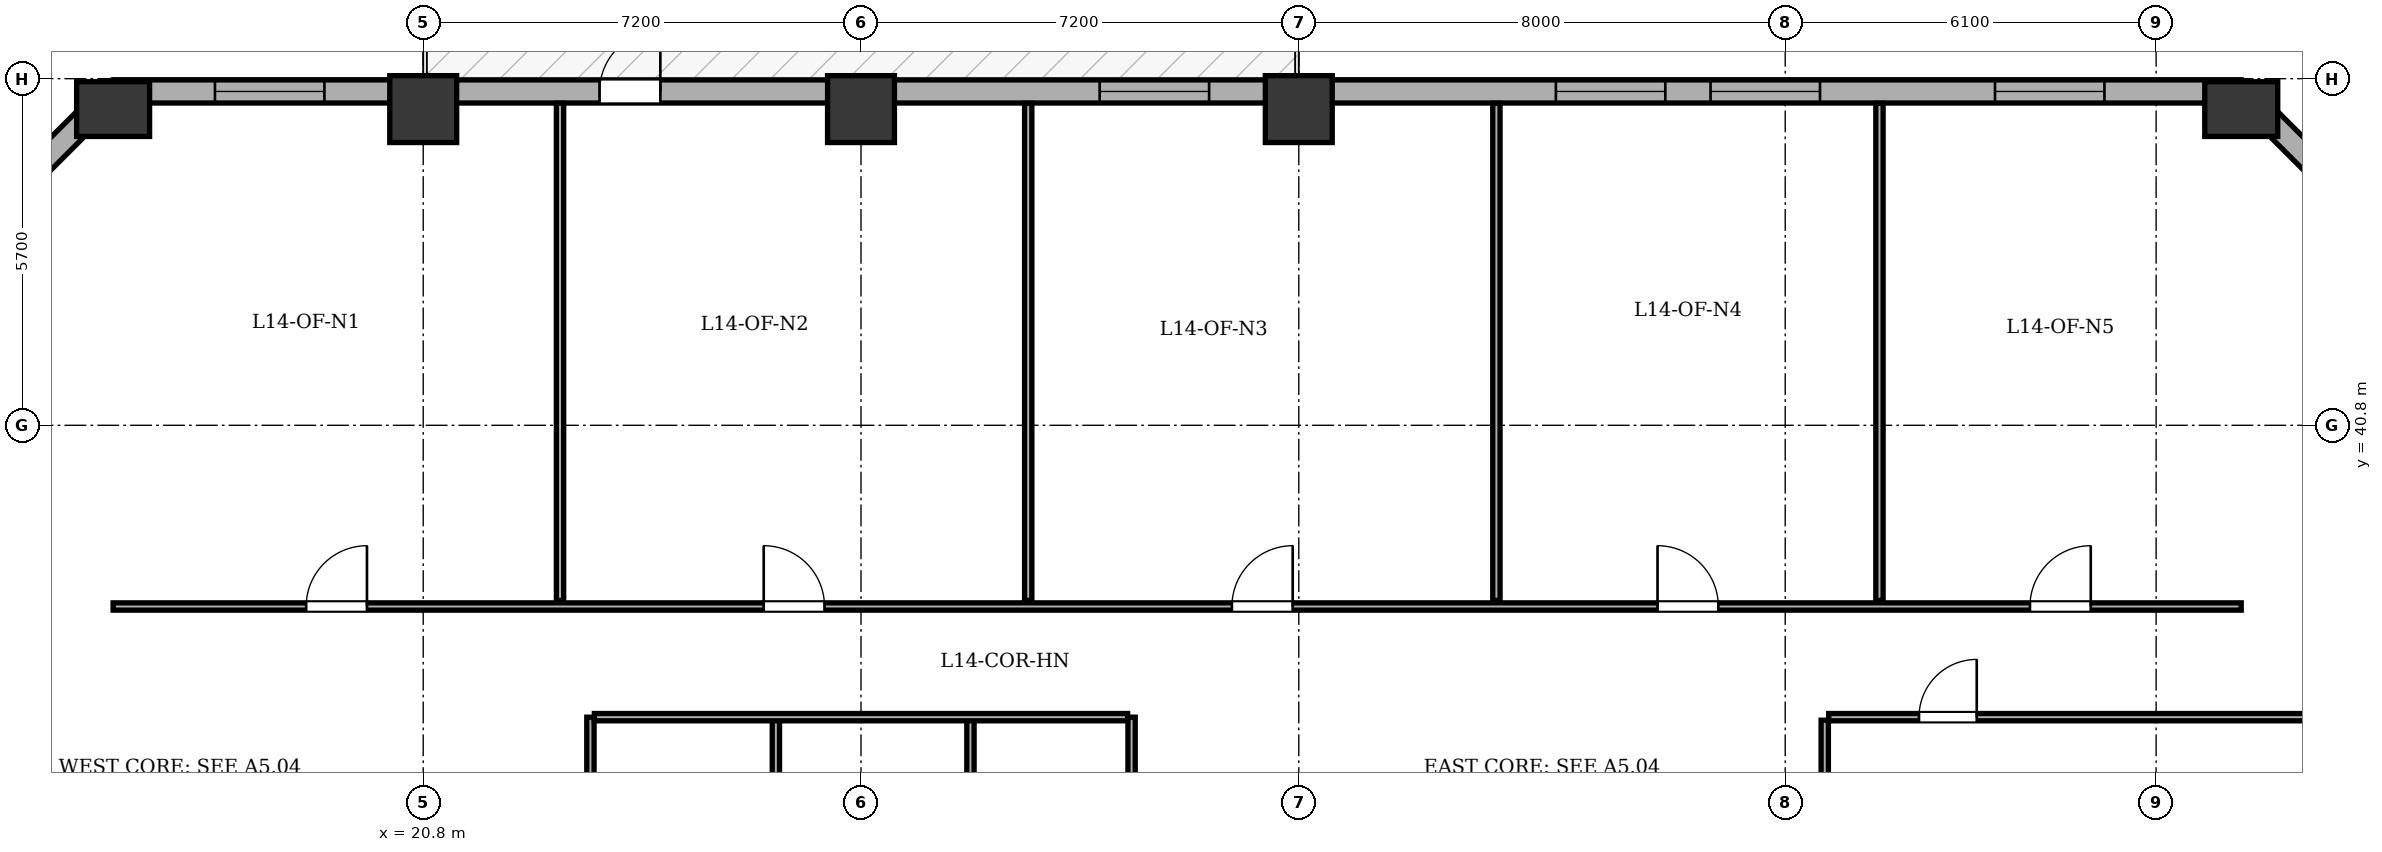
"""IFC4 building model, lengths in metres.
Left out: names, types, materials, properties, quantities, classifications, styles, units other than length and angle.
Written with IfcOpenShell. Run it as: python <this file> out.ifc"""

import sys

from ifc_helpers import new_model, si_unit, direction, frame, frame_2d, origin, origin_2d, place, context, subcontext, project, spatial, rectangle, extrude, element, fill, save


model = new_model("IFC4")
c1 = context("Model", 3, precision=1e-05, world=origin(), true_north=direction((0.0, 1.0)))
c2 = subcontext(c1, "Body", "Model", "MODEL_VIEW")
j1 = project(units=[si_unit("LENGTHUNIT", "METRE"), si_unit("PLANEANGLEUNIT", "RADIAN")], contexts=[c1])
p1 = place(None, origin())
s1 = spatial("IfcSite", under=j1, at=p1, CompositionType="ELEMENT")
p2 = place(p1, origin())
s2 = spatial("IfcBuilding", under=s1, at=p2, CompositionType="ELEMENT")
p3 = place(p2, frame((0.0, 0.0, 59.4)))
s3 = spatial("IfcBuildingStorey", under=s2, at=p3, CompositionType="ELEMENT", Elevation=59.4)
p4 = place(p3, frame((15.7, 46.0, 0.0), z_axis=(0.0, 0.0, 1.0), x_axis=(1.0, 0.0, 0.0)))
e1 = element("IfcColumn", 1, at=p4, inside=s3, PredefinedType="COLUMN", context=c2, shape_type="SweptSolid", body=[
    extrude(rectangle(XDim=0.9, YDim=1.2, at=origin_2d()), origin(), (0.0, 0.0, 1.0), 3.9),
])
for number, where, z_axis, x_axis in (
    (2, (20.8, 46.0, 0.0), (0.0, 0.0, 1.0), (1.0, 0.0, 0.0)),
    (3, (28.0, 46.0, 0.0), (0.0, 0.0, 1.0), (1.0, 0.0, 0.0)),
    (4, (35.2, 46.0, 0.0), (0.0, 0.0, 1.0), (1.0, 0.0, 0.0)),
):
    element("IfcColumn", number, at=place(p3, frame(where, z_axis=z_axis, x_axis=x_axis)), inside=s3, PredefinedType="COLUMN", context=c2, shape_type="SweptSolid", body=[
        extrude(rectangle(XDim=1.1, YDim=1.1, at=origin_2d()), origin(), (0.0, 0.0, 1.0), 3.9),
    ])
p5 = place(p3, frame((50.7, 46.0, 0.0), z_axis=(0.0, 0.0, 1.0), x_axis=(1.0, 0.0, 0.0)))
e5 = element("IfcColumn", 5, at=p5, inside=s3, PredefinedType="COLUMN", context=c2, shape_type="SweptSolid", body=[
    extrude(rectangle(XDim=0.9, YDim=1.2, at=origin_2d()), origin(), (0.0, 0.0, 1.0), 3.9),
])
p6 = place(p3, frame((10.91, 41.5, 0.0), z_axis=(0.0, 0.0, 1.0), x_axis=(0.707106781187, 0.707106781187, 0.0)))
e6 = element("IfcWall", 6, at=p6, inside=s3, PredefinedType="STANDARD", context=c2, shape_type="SweptSolid", body=[
    extrude(rectangle(XDim=6.774, YDim=0.38, at=frame_2d((3.387, 0.0))), origin(), (0.0, 0.0, 1.0), 3.135),
])
p7 = place(p6, frame((2.687, 0.0, 0.8)))
e7 = element("IfcOpeningElement", 7, at=p7, cuts=e6, PredefinedType="OPENING", context=c2, shape_type="SweptSolid", body=[
    extrude(rectangle(XDim=1.4, YDim=1.65, at=frame_2d((0.7, 0.825))), frame((0.0, 0.2, 0.0), z_axis=(0.0, -1.0, 0.0), x_axis=(1.0, 0.0, 0.0)), (0.0, 0.0, 1.0), 0.4),
])
p8 = place(p3, frame((15.7, 46.29, 0.0), z_axis=(0.0, 0.0, 1.0), x_axis=(1.0, 0.0, 0.0)))
e8 = element("IfcWall", 8, at=p8, inside=s3, PredefinedType="STANDARD", context=c2, shape_type="SweptSolid", body=[
    extrude(rectangle(XDim=35.0, YDim=0.38, at=frame_2d((17.5, 0.0))), origin(), (0.0, 0.0, 1.0), 3.135),
])
p9 = place(p8, frame((8.0, 0.0, 0.0)))
e9 = element("IfcOpeningElement", 9, at=p9, cuts=e8, PredefinedType="OPENING", context=c2, shape_type="SweptSolid", body=[
    extrude(rectangle(XDim=1.0, YDim=2.02, at=frame_2d((0.5, 1.01))), frame((0.0, 0.2, 0.0), z_axis=(0.0, -1.0, 0.0), x_axis=(1.0, 0.0, 0.0)), (0.0, 0.0, 1.0), 0.4),
])
p10 = place(p8, frame((1.675, 0.0, 0.8)))
e10 = element("IfcOpeningElement", 10, at=p10, cuts=e8, PredefinedType="OPENING", context=c2, shape_type="SweptSolid", body=[
    extrude(rectangle(XDim=1.8, YDim=1.9, at=frame_2d((0.9, 0.95))), frame((0.0, 0.2, 0.0), z_axis=(0.0, -1.0, 0.0), x_axis=(1.0, 0.0, 0.0)), (0.0, 0.0, 1.0), 0.4),
])
p11 = place(p8, frame((16.225, 0.0, 0.8)))
e11 = element("IfcOpeningElement", 11, at=p11, cuts=e8, PredefinedType="OPENING", context=c2, shape_type="SweptSolid", body=[
    extrude(rectangle(XDim=1.8, YDim=1.9, at=frame_2d((0.9, 0.95))), frame((0.0, 0.2, 0.0), z_axis=(0.0, -1.0, 0.0), x_axis=(1.0, 0.0, 0.0)), (0.0, 0.0, 1.0), 0.4),
])
p12 = place(p8, frame((23.728, 0.0, 0.8)))
e12 = element("IfcOpeningElement", 12, at=p12, cuts=e8, PredefinedType="OPENING", context=c2, shape_type="SweptSolid", body=[
    extrude(rectangle(XDim=1.8, YDim=1.9, at=frame_2d((0.9, 0.95))), frame((0.0, 0.2, 0.0), z_axis=(0.0, -1.0, 0.0), x_axis=(1.0, 0.0, 0.0)), (0.0, 0.0, 1.0), 0.4),
])
p13 = place(p8, frame((26.272, 0.0, 0.8)))
e13 = element("IfcOpeningElement", 13, at=p13, cuts=e8, PredefinedType="OPENING", context=c2, shape_type="SweptSolid", body=[
    extrude(rectangle(XDim=1.8, YDim=1.9, at=frame_2d((0.9, 0.95))), frame((0.0, 0.2, 0.0), z_axis=(0.0, -1.0, 0.0), x_axis=(1.0, 0.0, 0.0)), (0.0, 0.0, 1.0), 0.4),
])
p14 = place(p8, frame((30.95, 0.0, 0.8)))
e14 = element("IfcOpeningElement", 14, at=p14, cuts=e8, PredefinedType="OPENING", context=c2, shape_type="SweptSolid", body=[
    extrude(rectangle(XDim=1.8, YDim=1.9, at=frame_2d((0.9, 0.95))), frame((0.0, 0.2, 0.0), z_axis=(0.0, -1.0, 0.0), x_axis=(1.0, 0.0, 0.0)), (0.0, 0.0, 1.0), 0.4),
])
p15 = place(p3, frame((50.7, 46.29, 0.0), z_axis=(0.0, 0.0, 1.0), x_axis=(0.707106781187, -0.707106781187, 0.0)))
e15 = element("IfcWall", 15, at=p15, inside=s3, PredefinedType="STANDARD", context=c2, shape_type="SweptSolid", body=[
    extrude(rectangle(XDim=6.774, YDim=0.38, at=frame_2d((3.387, 0.0))), origin(), (0.0, 0.0, 1.0), 3.135),
])
p16 = place(p15, frame((2.687, 0.0, 0.8)))
e16 = element("IfcOpeningElement", 16, at=p16, cuts=e15, PredefinedType="OPENING", context=c2, shape_type="SweptSolid", body=[
    extrude(rectangle(XDim=1.4, YDim=1.65, at=frame_2d((0.7, 0.825))), frame((0.0, 0.2, 0.0), z_axis=(0.0, -1.0, 0.0), x_axis=(1.0, 0.0, 0.0)), (0.0, 0.0, 1.0), 0.4),
])
for number, where, z_axis, x_axis in (
    (17, (23.55, 24.715, 0.0), (0.0, 0.0, 1.0), (0.0, 1.0, 0.0)),
    (18, (32.45, 24.715, 0.0), (0.0, 0.0, 1.0), (0.0, 1.0, 0.0)),
    (19, (26.6, 24.715, 0.0), (0.0, 0.0, 1.0), (0.0, 1.0, 0.0)),
):
    element("IfcWall", number, at=place(p3, frame(where, z_axis=z_axis, x_axis=x_axis)), inside=s3, PredefinedType="PARTITIONING", context=c2, shape_type="SweptSolid", body=[
        extrude(rectangle(XDim=11.285, YDim=0.12, at=frame_2d((5.643, 0.0))), origin(), (0.0, 0.0, 1.0), 3.6),
    ])
p17 = place(p3, frame((29.8, 24.715, 0.0), z_axis=(0.0, 0.0, 1.0), x_axis=(0.0, 1.0, 0.0)))
e20 = element("IfcWall", 20, at=p17, inside=s3, PredefinedType="PARTITIONING", context=c2, shape_type="SweptSolid", body=[
    extrude(rectangle(XDim=11.285, YDim=0.12, at=frame_2d((5.643, 0.0))), origin(), (0.0, 0.0, 1.0), 3.135),
])
p18 = place(p3, frame((23.615, 36.0, 0.0), z_axis=(0.0, 0.0, 1.0), x_axis=(1.0, 0.0, 0.0)))
e21 = element("IfcWall", 21, at=p18, inside=s3, PredefinedType="PARTITIONING", context=c2, shape_type="SweptSolid", body=[
    extrude(rectangle(XDim=8.77, YDim=0.12, at=frame_2d((4.385, 0.0))), origin(), (0.0, 0.0, 1.0), 3.6),
])
p19 = place(p3, frame((15.7, 37.82, 0.0), z_axis=(0.0, 0.0, 1.0), x_axis=(1.0, 0.0, 0.0)))
e22 = element("IfcWall", 22, at=p19, inside=s3, PredefinedType="PARTITIONING", context=c2, shape_type="SweptSolid", body=[
    extrude(rectangle(XDim=35.0, YDim=0.12, at=frame_2d((17.5, 0.0))), origin(), (0.0, 0.0, 1.0), 3.6),
])
p20 = place(p19, frame((3.175, 0.0, 0.0)))
e23 = element("IfcOpeningElement", 23, at=p20, cuts=e22, PredefinedType="OPENING", context=c2, shape_type="SweptSolid", body=[
    extrude(rectangle(XDim=1.0, YDim=2.1, at=frame_2d((0.5, 1.05))), frame((0.0, 0.07, 0.0), z_axis=(0.0, -1.0, 0.0), x_axis=(1.0, 0.0, 0.0)), (0.0, 0.0, 1.0), 0.14),
])
p21 = place(p19, frame((10.7, 0.0, 0.0)))
e24 = element("IfcOpeningElement", 24, at=p21, cuts=e22, PredefinedType="OPENING", context=c2, shape_type="SweptSolid", body=[
    extrude(rectangle(XDim=1.0, YDim=2.1, at=frame_2d((0.5, 1.05))), frame((0.0, 0.07, 0.0), z_axis=(0.0, -1.0, 0.0), x_axis=(1.0, 0.0, 0.0)), (0.0, 0.0, 1.0), 0.14),
])
p22 = place(p19, frame((18.4, 0.0, 0.0)))
e25 = element("IfcOpeningElement", 25, at=p22, cuts=e22, PredefinedType="OPENING", context=c2, shape_type="SweptSolid", body=[
    extrude(rectangle(XDim=1.0, YDim=2.1, at=frame_2d((0.5, 1.05))), frame((0.0, 0.07, 0.0), z_axis=(0.0, -1.0, 0.0), x_axis=(1.0, 0.0, 0.0)), (0.0, 0.0, 1.0), 0.14),
])
p23 = place(p19, frame((25.4, 0.0, 0.0)))
e26 = element("IfcOpeningElement", 26, at=p23, cuts=e22, PredefinedType="OPENING", context=c2, shape_type="SweptSolid", body=[
    extrude(rectangle(XDim=1.0, YDim=2.1, at=frame_2d((0.5, 1.05))), frame((0.0, 0.07, 0.0), z_axis=(0.0, -1.0, 0.0), x_axis=(1.0, 0.0, 0.0)), (0.0, 0.0, 1.0), 0.14),
])
p24 = place(p19, frame((31.525, 0.0, 0.0)))
e27 = element("IfcOpeningElement", 27, at=p24, cuts=e22, PredefinedType="OPENING", context=c2, shape_type="SweptSolid", body=[
    extrude(rectangle(XDim=1.0, YDim=2.1, at=frame_2d((0.5, 1.05))), frame((0.0, 0.07, 0.0), z_axis=(0.0, -1.0, 0.0), x_axis=(1.0, 0.0, 0.0)), (0.0, 0.0, 1.0), 0.14),
])
for number, where, z_axis, x_axis in (
    (28, (23.05, 37.92, 0.0), (0.0, 0.0, 1.0), (0.0, 1.0, 0.0)),
    (29, (30.75, 37.92, 0.0), (0.0, 0.0, 1.0), (0.0, 1.0, 0.0)),
    (30, (38.45, 37.92, 0.0), (0.0, 0.0, 1.0), (0.0, 1.0, 0.0)),
    (31, (44.75, 37.92, 0.0), (0.0, 0.0, 1.0), (0.0, 1.0, 0.0)),
):
    element("IfcWall", number, at=place(p3, frame(where, z_axis=z_axis, x_axis=x_axis)), inside=s3, PredefinedType="PARTITIONING", context=c2, shape_type="SweptSolid", body=[
        extrude(rectangle(XDim=8.175, YDim=0.12, at=frame_2d((4.087, 0.0))), origin(), (0.0, 0.0, 1.0), 3.6),
    ])
p25 = place(p3, frame((43.85, 18.45, 0.0), z_axis=(0.0, 0.0, 1.0), x_axis=(0.0, 1.0, 0.0)))
e32 = element("IfcWall", 32, at=p25, inside=s3, PredefinedType="PARTITIONING", context=c2, shape_type="SweptSolid", body=[
    extrude(rectangle(XDim=17.5, YDim=0.12, at=frame_2d((8.75, 0.0))), origin(), (0.0, 0.0, 1.0), 3.6),
])
p26 = place(p3, frame((43.915, 36.0, 0.0), z_axis=(0.0, 0.0, 1.0), x_axis=(1.0, 0.0, 0.0)))
e33 = element("IfcWall", 33, at=p26, inside=s3, PredefinedType="PARTITIONING", context=c2, shape_type="SweptSolid", body=[
    extrude(rectangle(XDim=11.38, YDim=0.12, at=frame_2d((5.69, 0.0))), origin(), (0.0, 0.0, 1.0), 3.6),
])
p27 = place(p26, frame((1.485, 0.0, 0.0)))
e34 = element("IfcOpeningElement", 34, at=p27, cuts=e33, PredefinedType="OPENING", context=c2, shape_type="SweptSolid", body=[
    extrude(rectangle(XDim=0.95, YDim=2.1, at=frame_2d((0.475, 1.05))), frame((0.0, 0.07, 0.0), z_axis=(0.0, -1.0, 0.0), x_axis=(1.0, 0.0, 0.0)), (0.0, 0.0, 1.0), 0.14),
])
p28 = place(p9, origin())
e35 = element("IfcDoor", 35, at=p28, inside=s3, OperationType="SINGLE_SWING_RIGHT", PredefinedType="DOOR", context=c2, shape_type="SweptSolid", body=[
    extrude(rectangle(XDim=1.0, YDim=2.02, at=frame_2d((0.5, 1.01))), frame((0.0, 0.025, 0.0), z_axis=(0.0, -1.0, 0.0), x_axis=(1.0, 0.0, 0.0)), (0.0, 0.0, 1.0), 0.05),
])
fill(e9, e35)
p29 = place(p10, origin())
e36 = element("IfcWindow", 36, at=p29, inside=s3, PartitioningType="SINGLE_PANEL", PredefinedType="WINDOW", context=c2, shape_type="SweptSolid", body=[
    extrude(rectangle(XDim=1.8, YDim=1.9, at=frame_2d((0.9, 0.95))), frame((0.0, -0.01, 0.0), z_axis=(0.0, -1.0, 0.0), x_axis=(1.0, 0.0, 0.0)), (0.0, 0.0, 1.0), 0.06),
])
fill(e10, e36)
p30 = place(p11, origin())
e37 = element("IfcWindow", 37, at=p30, inside=s3, PartitioningType="SINGLE_PANEL", PredefinedType="WINDOW", context=c2, shape_type="SweptSolid", body=[
    extrude(rectangle(XDim=1.8, YDim=1.9, at=frame_2d((0.9, 0.95))), frame((0.0, -0.01, 0.0), z_axis=(0.0, -1.0, 0.0), x_axis=(1.0, 0.0, 0.0)), (0.0, 0.0, 1.0), 0.06),
])
fill(e11, e37)
p31 = place(p12, origin())
e38 = element("IfcWindow", 38, at=p31, inside=s3, PartitioningType="SINGLE_PANEL", PredefinedType="WINDOW", context=c2, shape_type="SweptSolid", body=[
    extrude(rectangle(XDim=1.8, YDim=1.9, at=frame_2d((0.9, 0.95))), frame((0.0, -0.01, 0.0), z_axis=(0.0, -1.0, 0.0), x_axis=(1.0, 0.0, 0.0)), (0.0, 0.0, 1.0), 0.06),
])
fill(e12, e38)
p32 = place(p13, origin())
e39 = element("IfcWindow", 39, at=p32, inside=s3, PartitioningType="SINGLE_PANEL", PredefinedType="WINDOW", context=c2, shape_type="SweptSolid", body=[
    extrude(rectangle(XDim=1.8, YDim=1.9, at=frame_2d((0.9, 0.95))), frame((0.0, -0.01, 0.0), z_axis=(0.0, -1.0, 0.0), x_axis=(1.0, 0.0, 0.0)), (0.0, 0.0, 1.0), 0.06),
])
fill(e13, e39)
p33 = place(p14, origin())
e40 = element("IfcWindow", 40, at=p33, inside=s3, PartitioningType="SINGLE_PANEL", PredefinedType="WINDOW", context=c2, shape_type="SweptSolid", body=[
    extrude(rectangle(XDim=1.8, YDim=1.9, at=frame_2d((0.9, 0.95))), frame((0.0, -0.01, 0.0), z_axis=(0.0, -1.0, 0.0), x_axis=(1.0, 0.0, 0.0)), (0.0, 0.0, 1.0), 0.06),
])
fill(e14, e40)
p34 = place(p20, origin())
e41 = element("IfcDoor", 41, at=p34, inside=s3, OperationType="SINGLE_SWING_RIGHT", PredefinedType="DOOR", context=c2, shape_type="SweptSolid", body=[
    extrude(rectangle(XDim=1.0, YDim=2.1, at=frame_2d((0.5, 1.05))), frame((0.0, 0.025, 0.0), z_axis=(0.0, -1.0, 0.0), x_axis=(1.0, 0.0, 0.0)), (0.0, 0.0, 1.0), 0.05),
])
fill(e23, e41)
p35 = place(p21, origin())
e42 = element("IfcDoor", 42, at=p35, inside=s3, OperationType="SINGLE_SWING_LEFT", PredefinedType="DOOR", context=c2, shape_type="SweptSolid", body=[
    extrude(rectangle(XDim=1.0, YDim=2.1, at=frame_2d((0.5, 1.05))), frame((0.0, 0.025, 0.0), z_axis=(0.0, -1.0, 0.0), x_axis=(1.0, 0.0, 0.0)), (0.0, 0.0, 1.0), 0.05),
])
fill(e24, e42)
p36 = place(p22, origin())
e43 = element("IfcDoor", 43, at=p36, inside=s3, OperationType="SINGLE_SWING_RIGHT", PredefinedType="DOOR", context=c2, shape_type="SweptSolid", body=[
    extrude(rectangle(XDim=1.0, YDim=2.1, at=frame_2d((0.5, 1.05))), frame((0.0, 0.025, 0.0), z_axis=(0.0, -1.0, 0.0), x_axis=(1.0, 0.0, 0.0)), (0.0, 0.0, 1.0), 0.05),
])
fill(e25, e43)
p37 = place(p23, origin())
e44 = element("IfcDoor", 44, at=p37, inside=s3, OperationType="SINGLE_SWING_LEFT", PredefinedType="DOOR", context=c2, shape_type="SweptSolid", body=[
    extrude(rectangle(XDim=1.0, YDim=2.1, at=frame_2d((0.5, 1.05))), frame((0.0, 0.025, 0.0), z_axis=(0.0, -1.0, 0.0), x_axis=(1.0, 0.0, 0.0)), (0.0, 0.0, 1.0), 0.05),
])
fill(e26, e44)
p38 = place(p24, origin())
e45 = element("IfcDoor", 45, at=p38, inside=s3, OperationType="SINGLE_SWING_RIGHT", PredefinedType="DOOR", context=c2, shape_type="SweptSolid", body=[
    extrude(rectangle(XDim=1.0, YDim=2.1, at=frame_2d((0.5, 1.05))), frame((0.0, 0.025, 0.0), z_axis=(0.0, -1.0, 0.0), x_axis=(1.0, 0.0, 0.0)), (0.0, 0.0, 1.0), 0.05),
])
fill(e27, e45)
p39 = place(p27, origin())
e46 = element("IfcDoor", 46, at=p39, inside=s3, OperationType="SINGLE_SWING_RIGHT", PredefinedType="DOOR", context=c2, shape_type="SweptSolid", body=[
    extrude(rectangle(XDim=0.95, YDim=2.1, at=frame_2d((0.475, 1.05))), frame((0.0, 0.025, 0.0), z_axis=(0.0, -1.0, 0.0), x_axis=(1.0, 0.0, 0.0)), (0.0, 0.0, 1.0), 0.05),
])
fill(e34, e46)
save(model, sys.argv[1])
